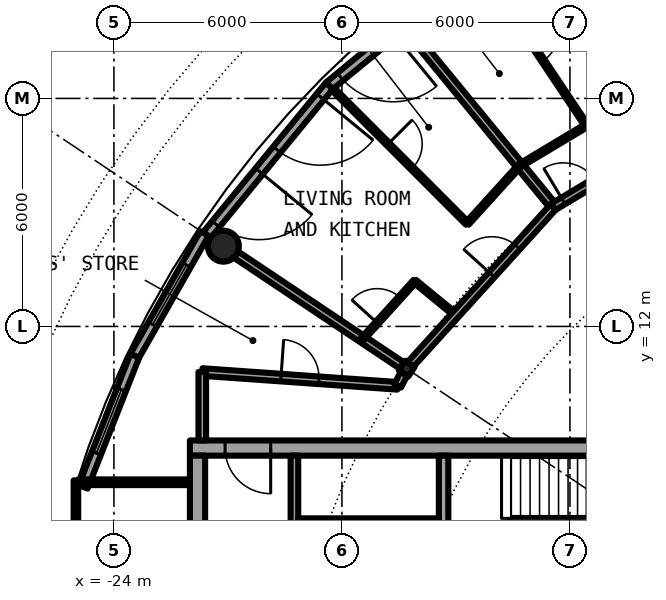
"""IFC4 building model, lengths in metres.
Left out: names, types, materials, properties, quantities, classifications, styles, units other than length and angle.
Written with IfcOpenShell. Run it as: python <this file> out.ifc"""

import sys

from ifc_helpers import new_model, si_unit, direction, frame, frame_2d, origin, origin_2d, place, context, subcontext, project, spatial, rectangle, hollow_circle, i_section, extrude, element, fill, save


model = new_model("IFC4")
c1 = context("Model", 3, precision=1e-05, world=origin(), true_north=direction((0.0, 1.0)))
c2 = subcontext(c1, "Body", "Model", "MODEL_VIEW")
j1 = project(units=[si_unit("LENGTHUNIT", "METRE"), si_unit("PLANEANGLEUNIT", "RADIAN")], contexts=[c1])
p1 = place(None, origin())
s1 = spatial("IfcSite", under=j1, at=p1, CompositionType="ELEMENT")
p2 = place(p1, origin())
s2 = spatial("IfcBuilding", under=s1, at=p2, CompositionType="ELEMENT")
p3 = place(p2, frame((0.0, 0.0, 237.1)))
s3 = spatial("IfcBuildingStorey", under=s2, at=p3, CompositionType="ELEMENT", Elevation=237.1)
p4 = place(p3, frame((-21.119, 14.112, 0.0), z_axis=(0.0, 0.0, 1.0), x_axis=(1.0, 0.0, 0.0)))
e1 = element("IfcColumn", 1, at=p4, inside=s3, PredefinedType="COLUMN", context=c2, shape_type="SweptSolid", body=[
    extrude(hollow_circle(Radius=0.406, WallThickness=0.03, at=origin_2d()), origin(), (0.0, 0.0, 1.0), 3.05),
])
p5 = place(p3, frame((-16.297, 10.889, 0.0), z_axis=(0.0, 0.0, 1.0), x_axis=(-0.831469612303, 0.55557023302, 0.0)))
e2 = element("IfcColumn", 2, at=p5, inside=s3, PredefinedType="COLUMN", context=c2, shape_type="SweptSolid", body=[
    extrude(i_section(OverallWidth=0.3, OverallDepth=0.3, WebThickness=0.011, FlangeThickness=0.019, FilletRadius=0.027, at=origin_2d()), origin(), (0.0, 0.0, 1.0), 3.05),
])
p6 = place(p3, frame((-14.403, 21.556, 0.0), z_axis=(0.0, 0.0, 1.0), x_axis=(-0.77306189429, -0.63433059803, 0.0)))
e3 = element("IfcWall", 3, at=p6, inside=s3, PredefinedType="SOLIDWALL", context=c2, shape_type="SweptSolid", body=[
    extrude(rectangle(XDim=5.082, YDim=0.25, at=frame_2d((2.541, 0.0))), origin(), (0.0, 0.0, 1.0), 2.7),
])
p7 = place(p6, frame((0.374, 0.0, 0.0)))
e4 = element("IfcOpeningElement", 4, at=p7, cuts=e3, PredefinedType="OPENING", context=c2, shape_type="SweptSolid", body=[
    extrude(rectangle(XDim=1.8, YDim=2.2, at=frame_2d((0.9, 1.1))), frame((0.0, 0.135, 0.0), z_axis=(0.0, -1.0, 0.0), x_axis=(1.0, 0.0, 0.0)), (0.0, 0.0, 1.0), 0.27),
])
p8 = place(p6, frame((2.909, 0.0, 0.0)))
e5 = element("IfcOpeningElement", 5, at=p8, cuts=e3, PredefinedType="OPENING", context=c2, shape_type="SweptSolid", body=[
    extrude(rectangle(XDim=1.8, YDim=2.2, at=frame_2d((0.9, 1.1))), frame((0.0, 0.135, 0.0), z_axis=(0.0, -1.0, 0.0), x_axis=(1.0, 0.0, 0.0)), (0.0, 0.0, 1.0), 0.27),
])
p9 = place(p3, frame((-18.332, 18.332, 0.0), z_axis=(0.0, 0.0, 1.0), x_axis=(-0.63433059803, -0.77306189429, 0.0)))
e6 = element("IfcWall", 6, at=p9, inside=s3, PredefinedType="SOLIDWALL", context=c2, shape_type="SweptSolid", body=[
    extrude(rectangle(XDim=5.082, YDim=0.25, at=frame_2d((2.541, 0.0))), origin(), (0.0, 0.0, 1.0), 2.7),
])
p10 = place(p9, frame((0.374, 0.0, 0.0)))
e7 = element("IfcOpeningElement", 7, at=p10, cuts=e6, PredefinedType="OPENING", context=c2, shape_type="SweptSolid", body=[
    extrude(rectangle(XDim=1.8, YDim=2.2, at=frame_2d((0.9, 1.1))), frame((0.0, 0.135, 0.0), z_axis=(0.0, -1.0, 0.0), x_axis=(1.0, 0.0, 0.0)), (0.0, 0.0, 1.0), 0.27),
])
p11 = place(p9, frame((2.909, 0.0, 0.0)))
e8 = element("IfcOpeningElement", 8, at=p11, cuts=e6, PredefinedType="OPENING", context=c2, shape_type="SweptSolid", body=[
    extrude(rectangle(XDim=1.8, YDim=2.2, at=frame_2d((0.9, 1.1))), frame((0.0, 0.135, 0.0), z_axis=(0.0, -1.0, 0.0), x_axis=(1.0, 0.0, 0.0)), (0.0, 0.0, 1.0), 0.27),
])
p12 = place(p3, frame((-21.618, 14.445, 0.0), z_axis=(0.0, 0.0, 1.0), x_axis=(-0.495031435966, -0.868875064325, 0.0)))
e9 = element("IfcWall", 9, at=p12, inside=s3, PredefinedType="SOLIDWALL", context=c2, shape_type="SweptSolid", body=[
    extrude(rectangle(XDim=3.705, YDim=0.25, at=frame_2d((1.853, 0.0))), origin(), (0.0, 0.0, 1.0), 2.7),
])
p13 = place(p12, frame((0.952, 0.0, 0.3)))
e10 = element("IfcOpeningElement", 10, at=p13, cuts=e9, PredefinedType="OPENING", context=c2, shape_type="SweptSolid", body=[
    extrude(rectangle(XDim=1.8, YDim=2.1, at=frame_2d((0.9, 1.05))), frame((0.0, 0.135, 0.0), z_axis=(0.0, -1.0, 0.0), x_axis=(1.0, 0.0, 0.0)), (0.0, 0.0, 1.0), 0.27),
])
p14 = place(p3, frame((-23.452, 11.226, 0.0), z_axis=(0.0, 0.0, 1.0), x_axis=(-0.366351636034, -0.930476479432, 0.0)))
e11 = element("IfcWall", 11, at=p14, inside=s3, PredefinedType="SOLIDWALL", context=c2, shape_type="SweptSolid", body=[
    extrude(rectangle(XDim=3.705, YDim=0.25, at=frame_2d((1.852, 0.0))), origin(), (0.0, 0.0, 1.0), 2.7),
])
p15 = place(p14, frame((0.952, 0.0, 0.3)))
e12 = element("IfcOpeningElement", 12, at=p15, cuts=e11, PredefinedType="OPENING", context=c2, shape_type="SweptSolid", body=[
    extrude(rectangle(XDim=1.8, YDim=2.1, at=frame_2d((0.9, 1.05))), frame((0.0, 0.135, 0.0), z_axis=(0.0, -1.0, 0.0), x_axis=(1.0, 0.0, 0.0)), (0.0, 0.0, 1.0), 0.27),
])
p16 = place(p3, frame((-8.6, 8.8, 0.0), z_axis=(0.0, 0.0, 1.0), x_axis=(-1.0, 0.0, 0.0)))
e13 = element("IfcWall", 13, at=p16, inside=s3, PredefinedType="SHEAR", context=c2, shape_type="SweptSolid", body=[
    extrude(rectangle(XDim=13.4, YDim=0.4, at=frame_2d((6.7, 0.0))), origin(), (0.0, 0.0, 1.0), 3.05),
])
p17 = place(p16, frame((11.275, 0.0, 0.0)))
e14 = element("IfcOpeningElement", 14, at=p17, cuts=e13, PredefinedType="OPENING", context=c2, shape_type="SweptSolid", body=[
    extrude(rectangle(XDim=1.2, YDim=2.3, at=frame_2d((0.6, 1.15))), frame((0.0, 0.21, 0.0), z_axis=(0.0, -1.0, 0.0), x_axis=(1.0, 0.0, 0.0)), (0.0, 0.0, 1.0), 0.42),
])
p18 = place(p3, frame((-21.8, -8.6, 0.0), z_axis=(0.0, 0.0, 1.0), x_axis=(0.0, 1.0, 0.0)))
e15 = element("IfcWall", 15, at=p18, inside=s3, PredefinedType="SHEAR", context=c2, shape_type="SweptSolid", body=[
    extrude(rectangle(XDim=17.2, YDim=0.4, at=frame_2d((8.6, 0.0))), origin(), (0.0, 0.0, 1.0), 3.05),
])
p19 = place(p18, frame((7.7, 0.0, 0.0)))
e16 = element("IfcOpeningElement", 16, at=p19, cuts=e15, PredefinedType="OPENING", context=c2, shape_type="SweptSolid", body=[
    extrude(rectangle(XDim=1.8, YDim=2.3, at=frame_2d((0.9, 1.15))), frame((0.0, 0.21, 0.0), z_axis=(0.0, -1.0, 0.0), x_axis=(1.0, 0.0, 0.0)), (0.0, 0.0, 1.0), 0.42),
])
p20 = place(p3, frame((-15.325, 8.6, 0.0), z_axis=(0.0, 0.0, 1.0), x_axis=(0.0, -1.0, 0.0)))
e17 = element("IfcWall", 17, at=p20, inside=s3, PredefinedType="SHEAR", context=c2, shape_type="SweptSolid", body=[
    extrude(rectangle(XDim=3.95, YDim=0.25, at=frame_2d((1.975, 0.0))), origin(), (0.0, 0.0, 1.0), 3.05),
])
p21 = place(p20, frame((2.025, 0.0, 0.0)))
e18 = element("IfcOpeningElement", 18, at=p21, cuts=e17, PredefinedType="OPENING", context=c2, shape_type="SweptSolid", body=[
    extrude(rectangle(XDim=1.2, YDim=2.3, at=frame_2d((0.6, 1.15))), frame((0.0, 0.135, 0.0), z_axis=(0.0, -1.0, 0.0), x_axis=(1.0, 0.0, 0.0)), (0.0, 0.0, 1.0), 0.27),
])
p22 = place(p3, frame((-19.25, 8.6, 0.0), z_axis=(0.0, 0.0, 1.0), x_axis=(0.0, -1.0, 0.0)))
e19 = element("IfcWall", 19, at=p22, inside=s3, PredefinedType="SOLIDWALL", context=c2, shape_type="SweptSolid", body=[
    extrude(rectangle(XDim=7.025, YDim=0.2, at=frame_2d((3.513, 0.0))), origin(), (0.0, 0.0, 1.0), 2.7),
])
p23 = place(p22, frame((2.35, 0.0, 0.0)))
e20 = element("IfcOpeningElement", 20, at=p23, cuts=e19, PredefinedType="OPENING", context=c2, shape_type="SweptSolid", body=[
    extrude(rectangle(XDim=1.1, YDim=2.3, at=frame_2d((0.55, 1.15))), frame((0.0, 0.11, 0.0), z_axis=(0.0, -1.0, 0.0), x_axis=(1.0, 0.0, 0.0)), (0.0, 0.0, 1.0), 0.22),
])
p24 = place(p3, frame((-15.45, 6.875, 0.0), z_axis=(0.0, 0.0, 1.0), x_axis=(-1.0, 0.0, 0.0)))
e21 = element("IfcWall", 21, at=p24, inside=s3, PredefinedType="PARTITIONING", context=c2, shape_type="SweptSolid", body=[
    extrude(rectangle(XDim=3.7, YDim=0.15, at=frame_2d((1.85, 0.0))), origin(), (0.0, 0.0, 1.0), 2.7),
])
p25 = place(p24, frame((1.4, 0.0, 0.0)))
e22 = element("IfcOpeningElement", 22, at=p25, cuts=e21, PredefinedType="OPENING", context=c2, shape_type="SweptSolid", body=[
    extrude(rectangle(XDim=0.9, YDim=2.3, at=frame_2d((0.45, 1.15))), frame((0.0, 0.085, 0.0), z_axis=(0.0, -1.0, 0.0), x_axis=(1.0, 0.0, 0.0)), (0.0, 0.0, 1.0), 0.17),
])
p26 = place(p3, frame((-22.0, 7.9, 0.0), z_axis=(0.0, 0.0, 1.0), x_axis=(-1.0, 0.0, 0.0)))
e23 = element("IfcWall", 23, at=p26, inside=s3, PredefinedType="PARTITIONING", context=c2, shape_type="SweptSolid", body=[
    extrude(rectangle(XDim=2.94, YDim=0.15, at=frame_2d((1.47, 0.0))), origin(), (0.0, 0.0, 1.0), 2.7),
])
p27 = place(p3, frame((-25.0, 7.95, 0.0), z_axis=(0.0, 0.0, 1.0), x_axis=(0.0, -1.0, 0.0)))
e24 = element("IfcWall", 24, at=p27, inside=s3, PredefinedType="PARTITIONING", context=c2, shape_type="SweptSolid", body=[
    extrude(rectangle(XDim=15.9, YDim=0.12, at=frame_2d((7.95, 0.0))), origin(), (0.0, 0.0, 1.0), 2.7),
])
p28 = place(p27, frame((0.95, 0.0, 0.1)))
e25 = element("IfcOpeningElement", 25, at=p28, cuts=e24, PredefinedType="OPENING", context=c2, shape_type="SweptSolid", body=[
    extrude(rectangle(XDim=14.0, YDim=2.35, at=frame_2d((7.0, 1.175))), frame((0.0, 0.07, 0.0), z_axis=(0.0, -1.0, 0.0), x_axis=(1.0, 0.0, 0.0)), (0.0, 0.0, 1.0), 0.14),
])
p29 = place(p3, frame((-20.788, 13.89, 0.0), z_axis=(0.0, 0.0, 1.0), x_axis=(0.831406006746, -0.555665413668, 0.0)))
e26 = element("IfcWall", 26, at=p29, inside=s3, PredefinedType="PARTITIONING", context=c2, shape_type="SweptSolid", body=[
    extrude(rectangle(XDim=5.251, YDim=0.2, at=frame_2d((2.625, 0.0))), origin(), (0.0, 0.0, 1.0), 2.7),
])
p30 = place(p3, frame((-18.238, 18.249, 0.0), z_axis=(0.0, 0.0, 1.0), x_axis=(0.706911528738, -0.707301979735, 0.0)))
e27 = element("IfcWall", 27, at=p30, inside=s3, PredefinedType="PARTITIONING", context=c2, shape_type="SweptSolid", body=[
    extrude(rectangle(XDim=5.002, YDim=0.1, at=frame_2d((2.501, 0.0))), origin(), (0.0, 0.0, 1.0), 2.7),
])
p31 = place(p30, frame((2.051, 0.0, 0.0)))
e28 = element("IfcOpeningElement", 28, at=p31, cuts=e27, PredefinedType="OPENING", context=c2, shape_type="SweptSolid", body=[
    extrude(rectangle(XDim=0.9, YDim=2.3, at=frame_2d((0.45, 1.15))), frame((0.0, 0.06, 0.0), z_axis=(0.0, -1.0, 0.0), x_axis=(1.0, 0.0, 0.0)), (0.0, 0.0, 1.0), 0.12),
])
p32 = place(p3, frame((-16.366, 19.945, 0.0), z_axis=(0.0, 0.0, 1.0), x_axis=(0.634332904094, -0.773060002059, 0.0)))
e29 = element("IfcWall", 29, at=p32, inside=s3, PredefinedType="PARTITIONING", context=c2, shape_type="SweptSolid", body=[
    extrude(rectangle(XDim=6.2, YDim=0.2, at=frame_2d((3.1, 0.0))), origin(), (0.0, 0.0, 1.0), 2.7),
])
p33 = place(p3, frame((-16.083, 13.187, 0.0), z_axis=(0.0, 0.0, 1.0), x_axis=(0.773321325714, -0.634014295735, 0.0)))
e30 = element("IfcWall", 30, at=p33, inside=s3, PredefinedType="PARTITIONING", context=c2, shape_type="SweptSolid", body=[
    extrude(rectangle(XDim=1.386, YDim=0.1, at=frame_2d((0.693, 0.0))), origin(), (0.0, 0.0, 1.0), 2.7),
])
p34 = place(p3, frame((-13.902, 20.78, 0.0), z_axis=(0.0, 0.0, 1.0), x_axis=(0.55597277711, -0.831200499947, 0.0)))
e31 = element("IfcWall", 31, at=p34, inside=s3, PredefinedType="PARTITIONING", context=c2, shape_type="SweptSolid", body=[
    extrude(rectangle(XDim=4.204, YDim=0.1, at=frame_2d((2.102, 0.0))), origin(), (0.0, 0.0, 1.0), 2.7),
])
p35 = place(p34, frame((1.253, 0.0, 0.0)))
e32 = element("IfcOpeningElement", 32, at=p35, cuts=e31, PredefinedType="OPENING", context=c2, shape_type="SweptSolid", body=[
    extrude(rectangle(XDim=0.9, YDim=2.3, at=frame_2d((0.45, 1.15))), frame((0.0, 0.06, 0.0), z_axis=(0.0, -1.0, 0.0), x_axis=(1.0, 0.0, 0.0)), (0.0, 0.0, 1.0), 0.12),
])
p36 = place(p3, frame((-21.675, 10.8, 0.0), z_axis=(0.0, 0.0, 1.0), x_axis=(0.997515141784, -0.070452408845, 0.0)))
e33 = element("IfcWall", 33, at=p36, inside=s3, PredefinedType="PARTITIONING", context=c2, shape_type="SweptSolid", body=[
    extrude(rectangle(XDim=5.153, YDim=0.2, at=frame_2d((2.576, 0.0))), origin(), (0.0, 0.0, 1.0), 2.7),
])
p37 = place(p36, frame((2.076, 0.0, 0.0)))
e34 = element("IfcOpeningElement", 34, at=p37, cuts=e33, PredefinedType="OPENING", context=c2, shape_type="SweptSolid", body=[
    extrude(rectangle(XDim=1.0, YDim=2.3, at=frame_2d((0.5, 1.15))), frame((0.0, 0.11, 0.0), z_axis=(0.0, -1.0, 0.0), x_axis=(1.0, 0.0, 0.0)), (0.0, 0.0, 1.0), 0.22),
])
p38 = place(p3, frame((-16.195, 11.002, 0.0), z_axis=(0.0, 0.0, 1.0), x_axis=(0.671619657805, 0.740896102871, 0.0)))
e35 = element("IfcWall", 35, at=p38, inside=s3, PredefinedType="PARTITIONING", context=c2, shape_type="SweptSolid", body=[
    extrude(rectangle(XDim=5.6, YDim=0.2, at=frame_2d((2.8, 0.0))), origin(), (0.0, 0.0, 1.0), 2.45),
])
p39 = place(p38, frame((3.183, 0.0, 0.0)))
e36 = element("IfcOpeningElement", 36, at=p39, cuts=e35, PredefinedType="OPENING", context=c2, shape_type="SweptSolid", body=[
    extrude(rectangle(XDim=1.0, YDim=2.3, at=frame_2d((0.5, 1.15))), frame((0.0, 0.11, 0.0), z_axis=(0.0, -1.0, 0.0), x_axis=(1.0, 0.0, 0.0)), (0.0, 0.0, 1.0), 0.22),
])
p40 = place(p3, frame((-12.439, 15.146, 0.0), z_axis=(0.0, 0.0, 1.0), x_axis=(0.857560257806, 0.514383518624, 0.0)))
e37 = element("IfcWall", 37, at=p40, inside=s3, PredefinedType="PARTITIONING", context=c2, shape_type="SweptSolid", body=[
    extrude(rectangle(XDim=5.758, YDim=0.2, at=frame_2d((2.879, 0.0))), origin(), (0.0, 0.0, 1.0), 2.45),
])
p41 = place(p40, frame((0.307, 0.0, 0.0)))
e38 = element("IfcOpeningElement", 38, at=p41, cuts=e37, PredefinedType="OPENING", context=c2, shape_type="SweptSolid", body=[
    extrude(rectangle(XDim=1.0, YDim=2.3, at=frame_2d((0.5, 1.15))), frame((0.0, 0.11, 0.0), z_axis=(0.0, -1.0, 0.0), x_axis=(1.0, 0.0, 0.0)), (0.0, 0.0, 1.0), 0.22),
])
p42 = place(p3, frame((-16.535, 10.437, 0.0), z_axis=(0.0, 0.0, 1.0), x_axis=(0.465802239822, 0.884888848035, 0.0)))
e39 = element("IfcWall", 39, at=p42, inside=s3, PredefinedType="PARTITIONING", context=c2, shape_type="SweptSolid", body=[
    extrude(rectangle(XDim=0.361, YDim=0.2, at=frame_2d((0.18, 0.0))), origin(), (0.0, 0.0, 1.0), 2.7),
])
p43 = place(p3, frame((-17.461, 11.667, 0.0), z_axis=(0.0, 0.0, 1.0), x_axis=(0.671678456097, 0.74084279818, 0.0)))
e40 = element("IfcWall", 40, at=p43, inside=s3, PredefinedType="PARTITIONING", context=c2, shape_type="SweptSolid", body=[
    extrude(rectangle(XDim=2.054, YDim=0.1, at=frame_2d((1.027, 0.0))), origin(), (0.0, 0.0, 1.0), 2.7),
])
p44 = place(p43, frame((0.577, 0.0, 0.0)))
e41 = element("IfcOpeningElement", 41, at=p44, cuts=e40, PredefinedType="OPENING", context=c2, shape_type="SweptSolid", body=[
    extrude(rectangle(XDim=0.9, YDim=2.3, at=frame_2d((0.45, 1.15))), frame((0.0, 0.06, 0.0), z_axis=(0.0, -1.0, 0.0), x_axis=(1.0, 0.0, 0.0)), (0.0, 0.0, 1.0), 0.12),
])
p45 = place(p3, frame((-14.701, 14.711, 0.0), z_axis=(0.0, 0.0, 1.0), x_axis=(0.671678456097, 0.74084279818, 0.0)))
e42 = element("IfcWall", 42, at=p45, inside=s3, PredefinedType="PARTITIONING", context=c2, shape_type="SweptSolid", body=[
    extrude(rectangle(XDim=2.054, YDim=0.1, at=frame_2d((1.027, 0.0))), origin(), (0.0, 0.0, 1.0), 2.7),
])
p46 = place(p3, frame((-13.322, 16.233, 0.0), z_axis=(0.0, 0.0, 1.0), x_axis=(0.857713062192, 0.514128683254, 0.0)))
e43 = element("IfcWall", 43, at=p46, inside=s3, PredefinedType="PARTITIONING", context=c2, shape_type="SweptSolid", body=[
    extrude(rectangle(XDim=2.054, YDim=0.1, at=frame_2d((1.027, 0.0))), origin(), (0.0, 0.0, 1.0), 2.7),
])
p47 = place(p3, frame((-21.675, 9.0, 0.0), z_axis=(0.0, 0.0, 1.0), x_axis=(0.0, 1.0, 0.0)))
e44 = element("IfcWall", 44, at=p47, inside=s3, PredefinedType="PARTITIONING", context=c2, shape_type="SweptSolid", body=[
    extrude(rectangle(XDim=1.8, YDim=0.2, at=frame_2d((0.9, 0.0))), origin(), (0.0, 0.0, 1.0), 2.7),
])
p48 = place(p8, origin())
e45 = element("IfcDoor", 45, at=p48, inside=s3, OperationType="SINGLE_SWING_LEFT", PredefinedType="DOOR", context=c2, shape_type="SweptSolid", body=[
    extrude(rectangle(XDim=1.8, YDim=2.2, at=frame_2d((0.9, 1.1))), frame((0.0, 0.025, 0.0), z_axis=(0.0, -1.0, 0.0), x_axis=(1.0, 0.0, 0.0)), (0.0, 0.0, 1.0), 0.05),
])
fill(e5, e45)
p49 = place(p10, origin())
e46 = element("IfcDoor", 46, at=p49, inside=s3, OperationType="SINGLE_SWING_LEFT", PredefinedType="DOOR", context=c2, shape_type="SweptSolid", body=[
    extrude(rectangle(XDim=1.8, YDim=2.2, at=frame_2d((0.9, 1.1))), frame((0.0, 0.025, 0.0), z_axis=(0.0, -1.0, 0.0), x_axis=(1.0, 0.0, 0.0)), (0.0, 0.0, 1.0), 0.05),
])
fill(e7, e46)
p50 = place(p11, origin())
e47 = element("IfcDoor", 47, at=p50, inside=s3, OperationType="SINGLE_SWING_LEFT", PredefinedType="DOOR", context=c2, shape_type="SweptSolid", body=[
    extrude(rectangle(XDim=1.8, YDim=2.2, at=frame_2d((0.9, 1.1))), frame((0.0, 0.025, 0.0), z_axis=(0.0, -1.0, 0.0), x_axis=(1.0, 0.0, 0.0)), (0.0, 0.0, 1.0), 0.05),
])
fill(e8, e47)
p51 = place(p13, origin())
e48 = element("IfcWindow", 48, at=p51, inside=s3, PartitioningType="SINGLE_PANEL", PredefinedType="WINDOW", context=c2, shape_type="SweptSolid", body=[
    extrude(rectangle(XDim=1.8, YDim=2.1, at=frame_2d((0.9, 1.05))), frame((0.0, 0.03, 0.0), z_axis=(0.0, -1.0, 0.0), x_axis=(1.0, 0.0, 0.0)), (0.0, 0.0, 1.0), 0.06),
])
fill(e10, e48)
p52 = place(p15, origin())
e49 = element("IfcWindow", 49, at=p52, inside=s3, PartitioningType="SINGLE_PANEL", PredefinedType="WINDOW", context=c2, shape_type="SweptSolid", body=[
    extrude(rectangle(XDim=1.8, YDim=2.1, at=frame_2d((0.9, 1.05))), frame((0.0, 0.03, 0.0), z_axis=(0.0, -1.0, 0.0), x_axis=(1.0, 0.0, 0.0)), (0.0, 0.0, 1.0), 0.06),
])
fill(e12, e49)
p53 = place(p25, origin())
e50 = element("IfcDoor", 50, at=p53, inside=s3, OperationType="SINGLE_SWING_LEFT", PredefinedType="DOOR", context=c2, shape_type="SweptSolid", body=[
    extrude(rectangle(XDim=0.9, YDim=2.3, at=frame_2d((0.45, 1.15))), frame((0.0, 0.025, 0.0), z_axis=(0.0, -1.0, 0.0), x_axis=(1.0, 0.0, 0.0)), (0.0, 0.0, 1.0), 0.05),
])
fill(e22, e50)
p54 = place(p17, origin())
e51 = element("IfcDoor", 51, at=p54, inside=s3, OperationType="SINGLE_SWING_LEFT", PredefinedType="DOOR", context=c2, shape_type="SweptSolid", body=[
    extrude(rectangle(XDim=1.2, YDim=2.3, at=frame_2d((0.6, 1.15))), frame((0.0, 0.025, 0.0), z_axis=(0.0, -1.0, 0.0), x_axis=(1.0, 0.0, 0.0)), (0.0, 0.0, 1.0), 0.05),
])
fill(e14, e51)
p55 = place(p28, origin())
e52 = element("IfcWindow", 52, at=p55, inside=s3, PartitioningType="SINGLE_PANEL", PredefinedType="WINDOW", context=c2, shape_type="SweptSolid", body=[
    extrude(rectangle(XDim=14.0, YDim=2.35, at=frame_2d((7.0, 1.175))), frame((0.0, 0.03, 0.0), z_axis=(0.0, -1.0, 0.0), x_axis=(1.0, 0.0, 0.0)), (0.0, 0.0, 1.0), 0.06),
])
fill(e25, e52)
p56 = place(p41, origin())
e53 = element("IfcDoor", 53, at=p56, inside=s3, OperationType="SINGLE_SWING_LEFT", PredefinedType="DOOR", context=c2, shape_type="SweptSolid", body=[
    extrude(rectangle(XDim=1.0, YDim=2.3, at=frame_2d((0.5, 1.15))), frame((0.0, 0.025, 0.0), z_axis=(0.0, -1.0, 0.0), x_axis=(1.0, 0.0, 0.0)), (0.0, 0.0, 1.0), 0.05),
])
fill(e38, e53)
p57 = place(p35, origin())
e54 = element("IfcDoor", 54, at=p57, inside=s3, OperationType="SINGLE_SWING_LEFT", PredefinedType="DOOR", context=c2, shape_type="SweptSolid", body=[
    extrude(rectangle(XDim=0.9, YDim=2.3, at=frame_2d((0.45, 1.15))), frame((0.0, 0.025, 0.0), z_axis=(0.0, -1.0, 0.0), x_axis=(1.0, 0.0, 0.0)), (0.0, 0.0, 1.0), 0.05),
])
fill(e32, e54)
p58 = place(p39, origin())
e55 = element("IfcDoor", 55, at=p58, inside=s3, OperationType="SINGLE_SWING_RIGHT", PredefinedType="DOOR", context=c2, shape_type="SweptSolid", body=[
    extrude(rectangle(XDim=1.0, YDim=2.3, at=frame_2d((0.5, 1.15))), frame((0.0, 0.025, 0.0), z_axis=(0.0, -1.0, 0.0), x_axis=(1.0, 0.0, 0.0)), (0.0, 0.0, 1.0), 0.05),
])
fill(e36, e55)
p59 = place(p44, origin())
e56 = element("IfcDoor", 56, at=p59, inside=s3, OperationType="SINGLE_SWING_LEFT", PredefinedType="DOOR", context=c2, shape_type="SweptSolid", body=[
    extrude(rectangle(XDim=0.9, YDim=2.3, at=frame_2d((0.45, 1.15))), frame((0.0, 0.025, 0.0), z_axis=(0.0, -1.0, 0.0), x_axis=(1.0, 0.0, 0.0)), (0.0, 0.0, 1.0), 0.05),
])
fill(e41, e56)
p60 = place(p31, origin())
e57 = element("IfcDoor", 57, at=p60, inside=s3, OperationType="SINGLE_SWING_RIGHT", PredefinedType="DOOR", context=c2, shape_type="SweptSolid", body=[
    extrude(rectangle(XDim=0.9, YDim=2.3, at=frame_2d((0.45, 1.15))), frame((0.0, 0.025, 0.0), z_axis=(0.0, -1.0, 0.0), x_axis=(1.0, 0.0, 0.0)), (0.0, 0.0, 1.0), 0.05),
])
fill(e28, e57)
p61 = place(p37, origin())
e58 = element("IfcDoor", 58, at=p61, inside=s3, OperationType="SINGLE_SWING_RIGHT", PredefinedType="DOOR", context=c2, shape_type="SweptSolid", body=[
    extrude(rectangle(XDim=1.0, YDim=2.3, at=frame_2d((0.5, 1.15))), frame((0.0, 0.025, 0.0), z_axis=(0.0, -1.0, 0.0), x_axis=(1.0, 0.0, 0.0)), (0.0, 0.0, 1.0), 0.05),
])
fill(e34, e58)
save(model, sys.argv[1])
